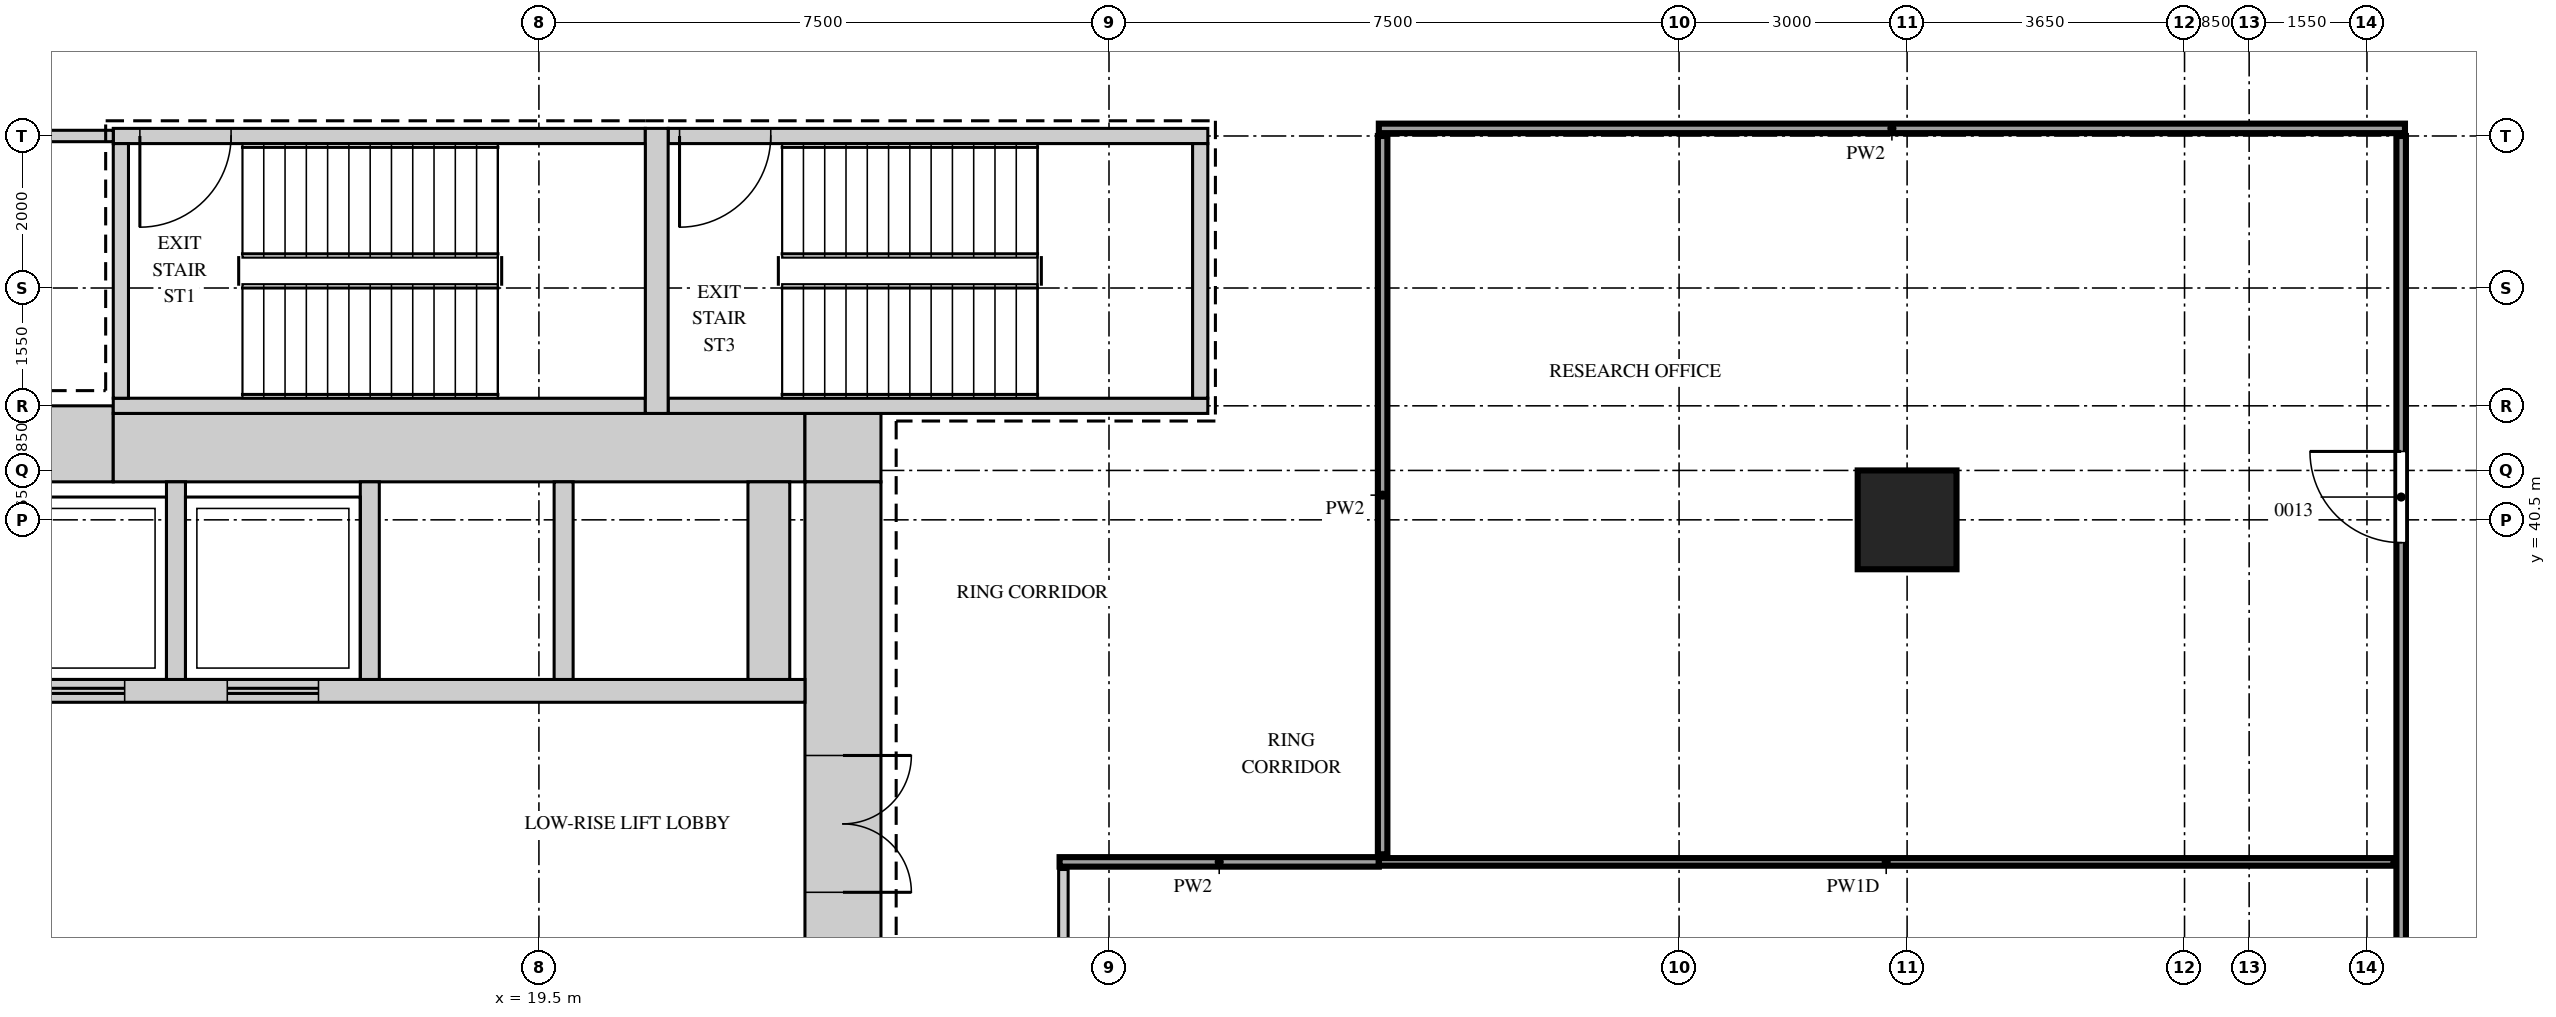
"""IFC4 building model, lengths in metres.
Left out: names, types, materials, properties, quantities, classifications, styles, units other than length and angle.
Written with IfcOpenShell. Run it as: python <this file> out.ifc"""

import sys

from ifc_helpers import new_model, si_unit, direction, frame, frame_2d, origin, origin_2d, place, context, subcontext, project, spatial, rectangle, extrude, source, transform, mapped, element, fill, save


model = new_model("IFC4")
c1 = context("Model", 3, precision=1e-05, world=origin(), true_north=direction((0.0, 1.0)))
c2 = subcontext(c1, "Body", "Model", "MODEL_VIEW")
j1 = project(units=[si_unit("LENGTHUNIT", "METRE"), si_unit("PLANEANGLEUNIT", "RADIAN")], contexts=[c1])
p1 = place(None, origin())
s1 = spatial("IfcSite", under=j1, at=p1, CompositionType="ELEMENT")
p2 = place(p1, origin())
s2 = spatial("IfcBuilding", under=s1, at=p2, CompositionType="ELEMENT")
p3 = place(p2, frame((0.0, 0.0, 136.7)))
s3 = spatial("IfcBuildingStorey", under=s2, at=p3, CompositionType="ELEMENT", Elevation=136.7)
m1 = source(origin(), c2, "Body", "SweptSolid", [
    extrude(rectangle(XDim=6.9, YDim=1.0, at=frame_2d((3.45, 0.0))), origin(), (0.0, 0.0, 1.0), 4.1),
])
p4 = place(p3, frame((7.0, 41.5, 0.0), z_axis=(0.0, 0.0, 1.0), x_axis=(1.0, 0.0, 0.0)))
e1 = element("IfcWall", 1, at=p4, inside=s3, PredefinedType="SHEAR", context=c2, shape_type="MappedRepresentation", body=[
    mapped(m1, transform((0.0, 0.0, 0.0))),
])
m2 = source(origin(), c2, "Body", "SweptSolid", [
    extrude(rectangle(XDim=9.1, YDim=0.9, at=frame_2d((4.55, 0.0))), origin(), (0.0, 0.0, 1.0), 4.1),
])
p5 = place(p3, frame((13.9, 41.45, 0.0), z_axis=(0.0, 0.0, 1.0), x_axis=(1.0, 0.0, 0.0)))
e2 = element("IfcWall", 2, at=p5, inside=s3, PredefinedType="SHEAR", context=c2, shape_type="MappedRepresentation", body=[
    mapped(m2, transform((0.0, 0.0, 0.0))),
])
m3 = source(origin(), c2, "Body", "SweptSolid", [
    extrude(rectangle(XDim=1.0, YDim=0.9, at=frame_2d((0.5, 0.0))), origin(), (0.0, 0.0, 1.0), 4.1),
])
p6 = place(p3, frame((23.0, 41.45, 0.0), z_axis=(0.0, 0.0, 1.0), x_axis=(1.0, 0.0, 0.0)))
e3 = element("IfcWall", 3, at=p6, inside=s3, PredefinedType="SHEAR", context=c2, shape_type="MappedRepresentation", body=[
    mapped(m3, transform((0.0, 0.0, 0.0))),
])
m4 = source(origin(), c2, "Body", "SweptSolid", [
    extrude(rectangle(XDim=28.0, YDim=1.0, at=frame_2d((14.0, 0.0))), origin(), (0.0, 0.0, 1.0), 4.1),
])
p7 = place(p3, frame((23.5, 13.0, 0.0), z_axis=(0.0, 0.0, 1.0), x_axis=(0.0, 1.0, 0.0)))
e4 = element("IfcWall", 4, at=p7, inside=s3, PredefinedType="SHEAR", context=c2, shape_type="MappedRepresentation", body=[
    mapped(m4, transform((0.0, 0.0, 0.0))),
])
m5 = source(origin(), c2, "Body", "SweptSolid", [
    extrude(rectangle(XDim=1.8, YDim=2.1, at=frame_2d((0.9, 1.05))), frame((0.0, 0.51, 0.0), z_axis=(0.0, -1.0, 0.0), x_axis=(1.0, 0.0, 0.0)), (0.0, 0.0, 1.0), 1.02),
])
p8 = place(p7, frame((22.6, 0.0, 0.0)))
e5 = element("IfcOpeningElement", 5, at=p8, cuts=e4, PredefinedType="OPENING", context=c2, shape_type="MappedRepresentation", body=[
    mapped(m5, transform((0.0, 0.0, 0.0))),
])
m6 = source(origin(), c2, "Body", "SweptSolid", [
    extrude(rectangle(XDim=1.2, YDim=2.1, at=frame_2d((0.6, 1.05))), frame((0.0, 0.51, 0.0), z_axis=(0.0, -1.0, 0.0), x_axis=(1.0, 0.0, 0.0)), (0.0, 0.0, 1.0), 1.02),
])
p9 = place(p7, frame((15.35, 0.0, 0.0)))
e6 = element("IfcOpeningElement", 6, at=p9, cuts=e4, PredefinedType="OPENING", context=c2, shape_type="MappedRepresentation", body=[
    mapped(m6, transform((0.0, 0.0, 0.0))),
])
m7 = source(origin(), c2, "Body", "SweptSolid", [
    extrude(rectangle(XDim=0.9, YDim=2.1, at=frame_2d((0.45, 1.05))), frame((0.0, 0.51, 0.0), z_axis=(0.0, -1.0, 0.0), x_axis=(1.0, 0.0, 0.0)), (0.0, 0.0, 1.0), 1.02),
])
p10 = place(p7, frame((1.35, 0.0, 0.0)))
e7 = element("IfcOpeningElement", 7, at=p10, cuts=e4, PredefinedType="OPENING", context=c2, shape_type="MappedRepresentation", body=[
    mapped(m7, transform((0.0, 0.0, 0.0))),
])
p11 = place(p7, frame((4.55, 0.0, 0.0)))
e8 = element("IfcOpeningElement", 8, at=p11, cuts=e4, PredefinedType="OPENING", context=c2, shape_type="MappedRepresentation", body=[
    mapped(m7, transform((0.0, 0.0, 0.0))),
])
p12 = place(p7, frame((7.8, 0.0, 0.0)))
e9 = element("IfcOpeningElement", 9, at=p12, cuts=e4, PredefinedType="OPENING", context=c2, shape_type="MappedRepresentation", body=[
    mapped(m7, transform((0.0, 0.0, 0.0))),
])
m8 = source(origin(), c2, "Body", "SweptSolid", [
    extrude(rectangle(XDim=7.0, YDim=0.2, at=frame_2d((3.5, 0.0))), origin(), (0.0, 0.0, 1.0), 4.1),
])
p13 = place(p3, frame((13.9, 45.55, 0.0), z_axis=(0.0, 0.0, 1.0), x_axis=(1.0, 0.0, 0.0)))
e10 = element("IfcWall", 10, at=p13, inside=s3, PredefinedType="SHEAR", context=c2, shape_type="MappedRepresentation", body=[
    mapped(m8, transform((0.0, 0.0, 0.0))),
])
m9 = source(origin(), c2, "Body", "SweptSolid", [
    extrude(rectangle(XDim=1.2, YDim=2.1, at=frame_2d((0.6, 1.05))), frame((0.0, 0.11, 0.0), z_axis=(0.0, -1.0, 0.0), x_axis=(1.0, 0.0, 0.0)), (0.0, 0.0, 1.0), 0.22),
])
p14 = place(p13, frame((0.35, 0.0, 0.0)))
e11 = element("IfcOpeningElement", 11, at=p14, cuts=e10, PredefinedType="OPENING", context=c2, shape_type="MappedRepresentation", body=[
    mapped(m9, transform((0.0, 0.0, 0.0))),
])
p15 = place(p3, frame((13.9, 42.0, 0.0), z_axis=(0.0, 0.0, 1.0), x_axis=(1.0, 0.0, 0.0)))
e12 = element("IfcWall", 12, at=p15, inside=s3, PredefinedType="SHEAR", context=c2, shape_type="MappedRepresentation", body=[
    mapped(m8, transform((0.0, 0.0, 0.0))),
])
m10 = source(origin(), c2, "Body", "SweptSolid", [
    extrude(rectangle(XDim=7.1, YDim=0.2, at=frame_2d((3.55, 0.0))), origin(), (0.0, 0.0, 1.0), 4.1),
])
p16 = place(p3, frame((21.2, 45.55, 0.0), z_axis=(0.0, 0.0, 1.0), x_axis=(1.0, 0.0, 0.0)))
e13 = element("IfcWall", 13, at=p16, inside=s3, PredefinedType="SHEAR", context=c2, shape_type="MappedRepresentation", body=[
    mapped(m10, transform((0.0, 0.0, 0.0))),
])
p17 = place(p16, frame((0.15, 0.0, 0.0)))
e14 = element("IfcOpeningElement", 14, at=p17, cuts=e13, PredefinedType="OPENING", context=c2, shape_type="MappedRepresentation", body=[
    mapped(m9, transform((0.0, 0.0, 0.0))),
])
p18 = place(p3, frame((21.2, 42.0, 0.0), z_axis=(0.0, 0.0, 1.0), x_axis=(1.0, 0.0, 0.0)))
e15 = element("IfcWall", 15, at=p18, inside=s3, PredefinedType="SHEAR", context=c2, shape_type="MappedRepresentation", body=[
    mapped(m10, transform((0.0, 0.0, 0.0))),
])
m11 = source(origin(), c2, "Body", "SweptSolid", [
    extrude(rectangle(XDim=3.75, YDim=0.3, at=frame_2d((1.875, 0.0))), origin(), (0.0, 0.0, 1.0), 4.1),
])
p19 = place(p3, frame((21.05, 41.9, 0.0), z_axis=(0.0, 0.0, 1.0), x_axis=(0.0, 1.0, 0.0)))
e16 = element("IfcWall", 16, at=p19, inside=s3, PredefinedType="SHEAR", context=c2, shape_type="MappedRepresentation", body=[
    mapped(m11, transform((0.0, 0.0, 0.0))),
])
m12 = source(origin(), c2, "Body", "SweptSolid", [
    extrude(rectangle(XDim=3.35, YDim=0.2, at=frame_2d((1.675, 0.0))), origin(), (0.0, 0.0, 1.0), 4.1),
])
for number, where, z_axis, x_axis in (
    (17, (14.0, 42.1, 0.0), (0.0, 0.0, 1.0), (0.0, 1.0, 0.0)),
    (18, (28.2, 42.1, 0.0), (0.0, 0.0, 1.0), (0.0, 1.0, 0.0)),
):
    element("IfcWall", number, at=place(p3, frame(where, z_axis=z_axis, x_axis=x_axis)), inside=s3, PredefinedType="SHEAR", context=c2, shape_type="MappedRepresentation", body=[
        mapped(m12, transform((0.0, 0.0, 0.0))),
    ])
m13 = source(origin(), c2, "Body", "SweptSolid", [
    extrude(rectangle(XDim=16.0, YDim=0.3, at=frame_2d((8.0, 0.0))), origin(), (0.0, 0.0, 1.0), 4.1),
])
p20 = place(p3, frame((7.0, 38.25, 0.0), z_axis=(0.0, 0.0, 1.0), x_axis=(1.0, 0.0, 0.0)))
e19 = element("IfcWall", 19, at=p20, inside=s3, PredefinedType="STANDARD", context=c2, shape_type="MappedRepresentation", body=[
    mapped(m13, transform((0.0, 0.0, 0.0))),
])
m14 = source(origin(), c2, "Body", "SweptSolid", [
    extrude(rectangle(XDim=1.2, YDim=2.1, at=frame_2d((0.6, 1.05))), frame((0.0, 0.16, 0.0), z_axis=(0.0, -1.0, 0.0), x_axis=(1.0, 0.0, 0.0)), (0.0, 0.0, 1.0), 0.32),
])
p21 = place(p20, frame((0.75, 0.0, 0.0)))
e20 = element("IfcOpeningElement", 20, at=p21, cuts=e19, PredefinedType="OPENING", context=c2, shape_type="MappedRepresentation", body=[
    mapped(m14, transform((0.0, 0.0, 0.0))),
])
p22 = place(p20, frame((3.3, 0.0, 0.0)))
e21 = element("IfcOpeningElement", 21, at=p22, cuts=e19, PredefinedType="OPENING", context=c2, shape_type="MappedRepresentation", body=[
    mapped(m14, transform((0.0, 0.0, 0.0))),
])
p23 = place(p20, frame((5.85, 0.0, 0.0)))
e22 = element("IfcOpeningElement", 22, at=p23, cuts=e19, PredefinedType="OPENING", context=c2, shape_type="MappedRepresentation", body=[
    mapped(m14, transform((0.0, 0.0, 0.0))),
])
p24 = place(p20, frame((8.4, 0.0, 0.0)))
e23 = element("IfcOpeningElement", 23, at=p24, cuts=e19, PredefinedType="OPENING", context=c2, shape_type="MappedRepresentation", body=[
    mapped(m14, transform((0.0, 0.0, 0.0))),
])
m15 = source(origin(), c2, "Body", "SweptSolid", [
    extrude(rectangle(XDim=2.6, YDim=0.25, at=frame_2d((1.3, 0.0))), origin(), (0.0, 0.0, 1.0), 4.1),
])
for number, where, z_axis, x_axis in (
    (24, (14.725, 38.4, 0.0), (0.0, 0.0, 1.0), (0.0, 1.0, 0.0)),
    (25, (17.275, 38.4, 0.0), (0.0, 0.0, 1.0), (0.0, 1.0, 0.0)),
    (26, (19.825, 38.4, 0.0), (0.0, 0.0, 1.0), (0.0, 1.0, 0.0)),
):
    element("IfcWall", number, at=place(p3, frame(where, z_axis=z_axis, x_axis=x_axis)), inside=s3, PredefinedType="STANDARD", context=c2, shape_type="MappedRepresentation", body=[
        mapped(m15, transform((0.0, 0.0, 0.0))),
    ])
m16 = source(origin(), c2, "Body", "SweptSolid", [
    extrude(rectangle(XDim=2.6, YDim=0.55, at=frame_2d((1.3, 0.0))), origin(), (0.0, 0.0, 1.0), 4.1),
])
p25 = place(p3, frame((22.525, 38.4, 0.0), z_axis=(0.0, 0.0, 1.0), x_axis=(0.0, 1.0, 0.0)))
e27 = element("IfcWall", 27, at=p25, inside=s3, PredefinedType="STANDARD", context=c2, shape_type="MappedRepresentation", body=[
    mapped(m16, transform((0.0, 0.0, 0.0))),
])
m17 = source(origin(), c2, "Body", "SweptSolid", [
    extrude(rectangle(XDim=1.3, YDim=1.3, at=origin_2d()), origin(), (0.0, 0.0, 1.0), 4.1),
])
p26 = place(p3, frame((37.5, 40.5, 0.0), z_axis=(0.0, 0.0, 1.0), x_axis=(1.0, 0.0, 0.0)))
e28 = element("IfcColumn", 28, at=p26, inside=s3, PredefinedType="COLUMN", context=c2, shape_type="MappedRepresentation", body=[
    mapped(m17, transform((0.0, 0.0, 0.0))),
])
m18 = source(origin(), c2, "Body", "SweptSolid", [
    extrude(rectangle(XDim=17.8, YDim=0.125, at=frame_2d((8.9, 0.0))), origin(), (0.0, 0.0, 1.0), 4.2),
])
p27 = place(p3, frame((26.4, 18.1, 0.0), z_axis=(0.0, 0.0, 1.0), x_axis=(0.0, 1.0, 0.0)))
e29 = element("IfcWall", 29, at=p27, inside=s3, PredefinedType="PARTITIONING", context=c2, shape_type="MappedRepresentation", body=[
    mapped(m18, transform((0.0, 0.0, 0.0))),
])
m19 = source(origin(), c2, "Body", "SweptSolid", [
    extrude(rectangle(XDim=27.45, YDim=0.125, at=frame_2d((13.725, 0.0))), origin(), (0.0, 0.0, 1.0), 4.2),
])
p28 = place(p3, frame((44.0, 18.1, 0.0), z_axis=(0.0, 0.0, 1.0), x_axis=(0.0, 1.0, 0.0)))
e30 = element("IfcWall", 30, at=p28, inside=s3, PredefinedType="PARTITIONING", context=c2, shape_type="MappedRepresentation", body=[
    mapped(m19, transform((0.0, 0.0, 0.0))),
])
m20 = source(origin(), c2, "Body", "SweptSolid", [
    extrude(rectangle(XDim=1.2, YDim=2.1, at=frame_2d((0.6, 1.05))), frame((0.0, 0.073, 0.0), z_axis=(0.0, -1.0, 0.0), x_axis=(1.0, 0.0, 0.0)), (0.0, 0.0, 1.0), 0.145),
])
p29 = place(p28, frame((8.3, 0.0, 0.0)))
e31 = element("IfcOpeningElement", 31, at=p29, cuts=e30, PredefinedType="OPENING", context=c2, shape_type="MappedRepresentation", body=[
    mapped(m20, transform((0.0, 0.0, 0.0))),
])
p30 = place(p28, frame((22.1, 0.0, 0.0)))
e32 = element("IfcOpeningElement", 32, at=p30, cuts=e30, PredefinedType="OPENING", context=c2, shape_type="MappedRepresentation", body=[
    mapped(m20, transform((0.0, 0.0, 0.0))),
])
m21 = source(origin(), c2, "Body", "SweptSolid", [
    extrude(rectangle(XDim=4.2, YDim=0.125, at=frame_2d((2.1, 0.0))), origin(), (0.0, 0.0, 1.0), 4.2),
])
p31 = place(p3, frame((26.35, 36.0, 0.0), z_axis=(0.0, 0.0, 1.0), x_axis=(1.0, 0.0, 0.0)))
e33 = element("IfcWall", 33, at=p31, inside=s3, PredefinedType="PARTITIONING", context=c2, shape_type="MappedRepresentation", body=[
    mapped(m21, transform((0.0, 0.0, 0.0))),
])
m22 = source(origin(), c2, "Body", "SweptSolid", [
    extrude(rectangle(XDim=13.35, YDim=0.1, at=frame_2d((6.675, 0.0))), origin(), (0.0, 0.0, 1.0), 4.2),
])
p32 = place(p3, frame((30.55, 36.0, 0.0), z_axis=(0.0, 0.0, 1.0), x_axis=(1.0, 0.0, 0.0)))
e34 = element("IfcWall", 34, at=p32, inside=s3, PredefinedType="PARTITIONING", context=c2, shape_type="MappedRepresentation", body=[
    mapped(m22, transform((0.0, 0.0, 0.0))),
])
m23 = source(origin(), c2, "Body", "SweptSolid", [
    extrude(rectangle(XDim=9.45, YDim=0.125, at=frame_2d((4.725, 0.0))), origin(), (0.0, 0.0, 1.0), 4.2),
])
p33 = place(p3, frame((30.6, 36.1, 0.0), z_axis=(0.0, 0.0, 1.0), x_axis=(0.0, 1.0, 0.0)))
e35 = element("IfcWall", 35, at=p33, inside=s3, PredefinedType="PARTITIONING", context=c2, shape_type="MappedRepresentation", body=[
    mapped(m23, transform((0.0, 0.0, 0.0))),
])
m24 = source(origin(), c2, "Body", "SweptSolid", [
    extrude(rectangle(XDim=7.95, YDim=0.15, at=frame_2d((3.975, 0.0))), origin(), (0.0, 0.0, 1.0), 4.2),
])
p34 = place(p3, frame((5.95, 45.55, 0.0), z_axis=(0.0, 0.0, 1.0), x_axis=(1.0, 0.0, 0.0)))
e36 = element("IfcWall", 36, at=p34, inside=s3, PredefinedType="PARTITIONING", context=c2, shape_type="MappedRepresentation", body=[
    mapped(m24, transform((0.0, 0.0, 0.0))),
])
m25 = source(origin(), c2, "Body", "SweptSolid", [
    extrude(rectangle(XDim=0.9, YDim=2.1, at=frame_2d((0.45, 1.05))), frame((0.0, 0.085, 0.0), z_axis=(0.0, -1.0, 0.0), x_axis=(1.0, 0.0, 0.0)), (0.0, 0.0, 1.0), 0.17),
])
p35 = place(p34, frame((3.55, 0.0, 0.0)))
e37 = element("IfcOpeningElement", 37, at=p35, cuts=e36, PredefinedType="OPENING", context=c2, shape_type="MappedRepresentation", body=[
    mapped(m25, transform((0.0, 0.0, 0.0))),
])
m26 = source(origin(), c2, "Body", "SweptSolid", [
    extrude(rectangle(XDim=13.5, YDim=0.125, at=frame_2d((6.75, 0.0))), origin(), (0.0, 0.0, 1.0), 4.2),
])
p36 = place(p3, frame((30.55, 45.65, 0.0), z_axis=(0.0, 0.0, 1.0), x_axis=(1.0, 0.0, 0.0)))
e38 = element("IfcWall", 38, at=p36, inside=s3, PredefinedType="PARTITIONING", context=c2, shape_type="MappedRepresentation", body=[
    mapped(m26, transform((0.0, 0.0, 0.0))),
])
m27 = source(origin(), c2, "Body", "SweptSolid", [
    extrude(rectangle(XDim=1.8, YDim=2.1, at=frame_2d((0.9, 1.05))), frame((0.0, 0.45, 0.0), z_axis=(0.0, -1.0, 0.0), x_axis=(1.0, 0.0, 0.0)), (0.0, 0.0, 1.0), 0.9),
])
p37 = place(p8, origin())
e39 = element("IfcDoor", 39, at=p37, inside=s3, OperationType="DOUBLE_DOOR_SINGLE_SWING", PredefinedType="DOOR", context=c2, shape_type="MappedRepresentation", body=[
    mapped(m27, transform((0.0, 0.0, 0.0))),
])
fill(e5, e39)
m28 = source(origin(), c2, "Body", "SweptSolid", [
    extrude(rectangle(XDim=1.2, YDim=2.1, at=frame_2d((0.6, 1.05))), frame((0.0, 0.025, 0.0), z_axis=(0.0, -1.0, 0.0), x_axis=(1.0, 0.0, 0.0)), (0.0, 0.0, 1.0), 0.05),
])
p38 = place(p30, origin())
e40 = element("IfcDoor", 40, at=p38, inside=s3, OperationType="SINGLE_SWING_LEFT", PredefinedType="DOOR", context=c2, shape_type="MappedRepresentation", body=[
    mapped(m28, transform((0.0, 0.0, 0.0))),
])
fill(e32, e40)
p39 = place(p14, origin())
e41 = element("IfcDoor", 41, at=p39, inside=s3, OperationType="SINGLE_SWING_LEFT", PredefinedType="DOOR", context=c2, shape_type="MappedRepresentation", body=[
    mapped(m28, transform((0.0, 0.0, 0.0))),
])
fill(e11, e41)
p40 = place(p17, origin())
e42 = element("IfcDoor", 42, at=p40, inside=s3, OperationType="SINGLE_SWING_LEFT", PredefinedType="DOOR", context=c2, shape_type="MappedRepresentation", body=[
    mapped(m28, transform((0.0, 0.0, 0.0))),
])
fill(e14, e42)
p41 = place(p23, origin())
e43 = element("IfcDoor", 43, at=p41, inside=s3, OperationType="DOUBLE_DOOR_SLIDING", PredefinedType="DOOR", context=c2, shape_type="MappedRepresentation", body=[
    mapped(m28, transform((0.0, 0.0, 0.0))),
])
fill(e22, e43)
p42 = place(p24, origin())
e44 = element("IfcDoor", 44, at=p42, inside=s3, OperationType="DOUBLE_DOOR_SLIDING", PredefinedType="DOOR", context=c2, shape_type="MappedRepresentation", body=[
    mapped(m28, transform((0.0, 0.0, 0.0))),
])
fill(e23, e44)
save(model, sys.argv[1])
